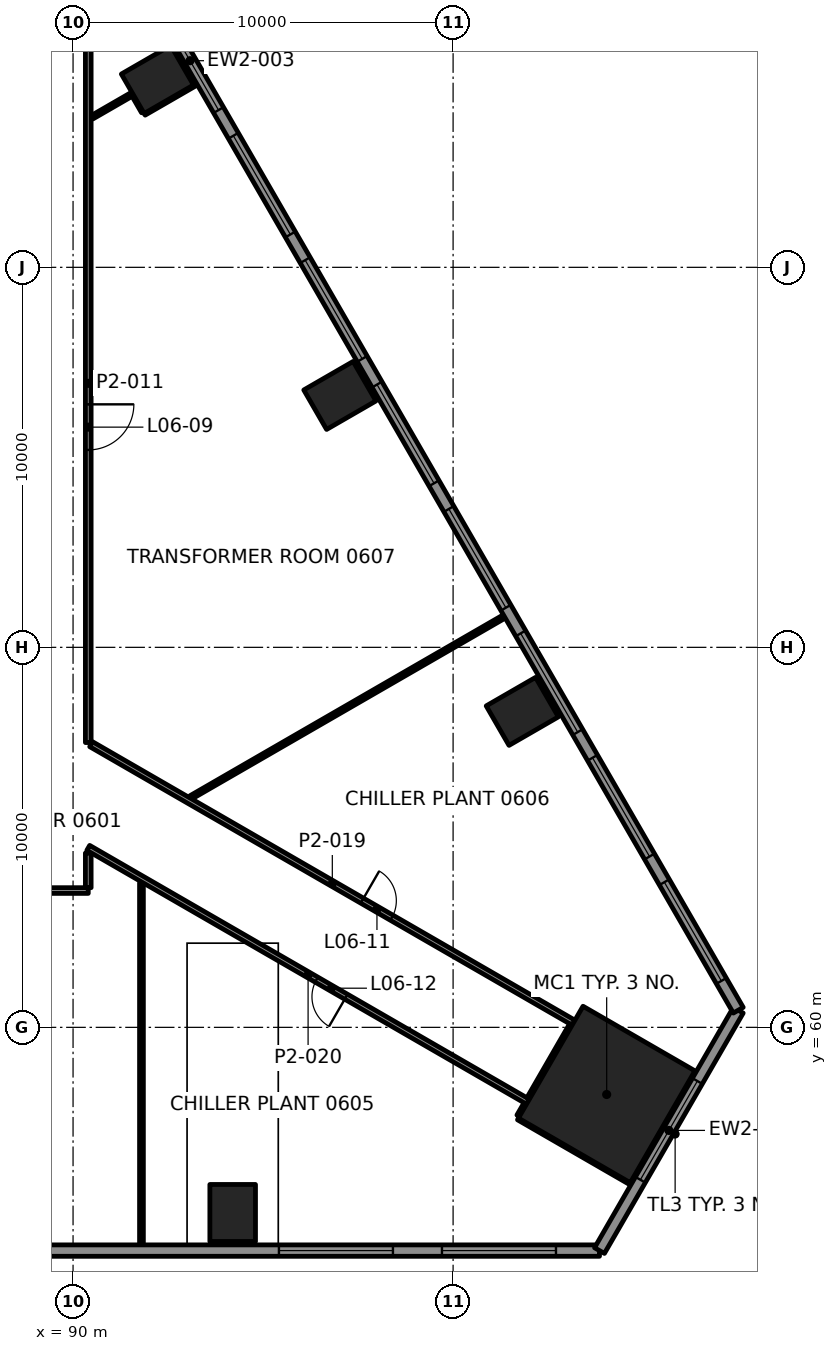
"""IFC4 building model, lengths in metres.
Left out: names, types, materials, properties, quantities, classifications, styles, units other than length and angle.
Written with IfcOpenShell. Run it as: python <this file> out.ifc"""

import sys

from ifc_helpers import new_model, si_unit, direction, frame, frame_2d, origin, origin_2d, place, context, subcontext, project, spatial, rectangle, extrude, element, fill, save


model = new_model("IFC4")
c1 = context("Model", 3, precision=1e-05, world=origin(), true_north=direction((0.0, 1.0)))
c2 = subcontext(c1, "Body", "Model", "MODEL_VIEW")
j1 = project(units=[si_unit("LENGTHUNIT", "METRE"), si_unit("PLANEANGLEUNIT", "RADIAN")], contexts=[c1])
p1 = place(None, origin())
s1 = spatial("IfcSite", under=j1, at=p1, CompositionType="ELEMENT")
p2 = place(p1, origin())
s2 = spatial("IfcBuilding", under=s1, at=p2, CompositionType="ELEMENT")
p3 = place(p2, frame((0.0, 0.0, 31.0)))
s3 = spatial("IfcBuildingStorey", under=s2, at=p3, CompositionType="ELEMENT", Elevation=31.0)
p4 = place(p3, frame((104.041, 58.233, 0.0), z_axis=(0.0, 0.0, 1.0), x_axis=(0.5, 0.866025403784, 0.0)))
e1 = element("IfcColumn", 1, at=p4, inside=s3, PredefinedType="COLUMN", context=c2, shape_type="SweptSolid", body=[
    extrude(rectangle(XDim=3.4, YDim=3.4, at=origin_2d()), origin(), (0.0, 0.0, 1.0), 4.5),
])
for number, where, z_axis, x_axis in (
    (2, (94.2, 55.115, -0.0), (0.0, 0.0, 1.0), (1.0, 0.0, 0.0)),
    (3, (101.821, 68.315, -0.0), (0.0, 0.0, 1.0), (-0.5, 0.866, 0.0)),
    (4, (97.021, 76.628, -0.0), (0.0, 0.0, 1.0), (-0.5, 0.866, 0.0)),
    (5, (92.22, 84.942, -0.0), (0.0, 0.0, 1.0), (-0.5, 0.866, 0.0)),
):
    element("IfcColumn", number, at=place(p3, frame(where, z_axis=z_axis, x_axis=x_axis)), inside=s3, PredefinedType="COLUMN", context=c2, shape_type="SweptSolid", body=[
        extrude(rectangle(XDim=1.2, YDim=1.5, at=origin_2d()), origin(), (0.0, 0.0, 1.0), 4.5),
    ])
p5 = place(p3, frame((90.4, 63.6, 0.0), z_axis=(0.0, 0.0, 1.0), x_axis=(-1.0, 0.0, 0.0)))
e6 = element("IfcWall", 6, at=p5, inside=s3, PredefinedType="PARTITIONING", context=c2, shape_type="SweptSolid", body=[
    extrude(rectangle(XDim=30.799, YDim=0.15, at=frame_2d((15.4, 0.0))), origin(), (0.0, 0.0, 1.0), 3.45),
])
p6 = place(p5, frame((6.001, 0.0, 0.0)))
e7 = element("IfcOpeningElement", 7, at=p6, cuts=e6, PredefinedType="OPENING", context=c2, shape_type="SweptSolid", body=[
    extrude(rectangle(XDim=1.2, YDim=2.1, at=frame_2d((0.6, 1.05))), frame((0.0, 0.085, 0.0), z_axis=(0.0, -1.0, 0.0), x_axis=(1.0, 0.0, 0.0)), (0.0, 0.0, 1.0), 0.17),
])
p7 = place(p5, frame((18.55, 0.0, 0.0)))
e8 = element("IfcOpeningElement", 8, at=p7, cuts=e6, PredefinedType="OPENING", context=c2, shape_type="SweptSolid", body=[
    extrude(rectangle(XDim=0.9, YDim=2.1, at=frame_2d((0.45, 1.05))), frame((0.0, 0.085, 0.0), z_axis=(0.0, -1.0, 0.0), x_axis=(1.0, 0.0, 0.0)), (0.0, 0.0, 1.0), 0.17),
])
p8 = place(p5, frame((27.198, 0.0, 0.0)))
e9 = element("IfcOpeningElement", 9, at=p8, cuts=e6, PredefinedType="OPENING", context=c2, shape_type="SweptSolid", body=[
    extrude(rectangle(XDim=1.2, YDim=2.1, at=frame_2d((0.6, 1.05))), frame((0.0, 0.085, 0.0), z_axis=(0.0, -1.0, 0.0), x_axis=(1.0, 0.0, 0.0)), (0.0, 0.0, 1.0), 0.17),
])
p9 = place(p3, frame((93.101, 66.052, 0.0), z_axis=(0.0, 0.0, 1.0), x_axis=(0.86603464891, 0.49998398663, 0.0)))
e10 = element("IfcWall", 10, at=p9, inside=s3, PredefinedType="PARTITIONING", context=c2, shape_type="SweptSolid", body=[
    extrude(rectangle(XDim=9.643, YDim=0.1, at=frame_2d((4.821, 0.0))), origin(), (0.0, 0.0, 1.0), 3.215),
])
p10 = place(p3, frame((91.871, 84.048, 0.0), z_axis=(0.0, 0.0, 1.0), x_axis=(0.866026058841, 0.499998865407, 0.0)))
e11 = element("IfcWall", 11, at=p10, inside=s3, PredefinedType="PARTITIONING", context=c2, shape_type="SweptSolid", body=[
    extrude(rectangle(XDim=1.708, YDim=0.1, at=frame_2d((0.854, 0.0))), origin(), (0.0, 0.0, 1.0), 3.215),
])
p11 = place(p3, frame((90.501, 83.95, 0.0), z_axis=(0.0, 0.0, 1.0), x_axis=(0.866057204957, 0.499944914708, 0.0)))
e12 = element("IfcWall", 12, at=p11, inside=s3, PredefinedType="PARTITIONING", context=c2, shape_type="SweptSolid", body=[
    extrude(rectangle(XDim=1.235, YDim=0.1, at=frame_2d((0.618, 0.0))), origin(), (0.0, 0.0, 1.0), 3.45),
])
p12 = place(p3, frame((101.744, 57.655, 0.0), z_axis=(0.0, 0.0, 1.0), x_axis=(0.500136362069, 0.865946660792, 0.0)))
e13 = element("IfcWall", 13, at=p12, inside=s3, PredefinedType="PARTITIONING", context=c2, shape_type="SweptSolid", body=[
    extrude(rectangle(XDim=0.375, YDim=0.15, at=frame_2d((0.187, 0.0))), origin(), (0.0, 0.0, 1.0), 3.45),
])
p13 = place(p3, frame((91.8, 54.155, 0.0), z_axis=(0.0, 0.0, 1.0), x_axis=(0.0, 1.0, 0.0)))
e14 = element("IfcWall", 14, at=p13, inside=s3, PredefinedType="PARTITIONING", context=c2, shape_type="SweptSolid", body=[
    extrude(rectangle(XDim=9.643, YDim=0.1, at=frame_2d((4.822, 0.0))), origin(), (0.0, 0.0, 1.0), 3.45),
])
p14 = place(p3, frame((90.4, 63.675, 0.0), z_axis=(0.0, 0.0, 1.0), x_axis=(0.0, 1.0, 0.0)))
e15 = element("IfcWall", 15, at=p14, inside=s3, PredefinedType="PARTITIONING", context=c2, shape_type="SweptSolid", body=[
    extrude(rectangle(XDim=0.912, YDim=0.15, at=frame_2d((0.456, 0.0))), origin(), (0.0, 0.0, 1.0), 3.45),
])
p15 = place(p3, frame((90.4, 86.399, 0.0), z_axis=(0.0, 0.0, 1.0), x_axis=(0.0, -1.0, 0.0)))
e16 = element("IfcWall", 16, at=p15, inside=s3, PredefinedType="PARTITIONING", context=c2, shape_type="SweptSolid", body=[
    extrude(rectangle(XDim=18.905, YDim=0.15, at=frame_2d((9.453, 0.0))), origin(), (0.0, 0.0, 1.0), 3.45),
])
p16 = place(p15, frame((10.005, 0.0, 0.0)))
e17 = element("IfcOpeningElement", 17, at=p16, cuts=e16, PredefinedType="OPENING", context=c2, shape_type="SweptSolid", body=[
    extrude(rectangle(XDim=1.2, YDim=2.1, at=frame_2d((0.6, 1.05))), frame((0.0, 0.085, 0.0), z_axis=(0.0, -1.0, 0.0), x_axis=(1.0, 0.0, 0.0)), (0.0, 0.0, 1.0), 0.17),
])
p17 = place(p3, frame((91.846, 84.092, 0.0), z_axis=(0.0, 0.0, 1.0), x_axis=(-0.500244977835, 0.865883919559, 0.0)))
e18 = element("IfcWall", 18, at=p17, inside=s3, PredefinedType="PARTITIONING", context=c2, shape_type="SweptSolid", body=[
    extrude(rectangle(XDim=0.499, YDim=0.1, at=frame_2d((0.25, 0.0))), origin(), (0.0, 0.0, 1.0), 3.45),
])
p18 = place(p3, frame((90.475, 67.451, 0.0), z_axis=(0.0, 0.0, 1.0), x_axis=(0.866022484069, -0.500005057062, 0.0)))
e19 = element("IfcWall", 19, at=p18, inside=s3, PredefinedType="PARTITIONING", context=c2, shape_type="SweptSolid", body=[
    extrude(rectangle(XDim=14.657, YDim=0.15, at=frame_2d((7.329, 0.0))), origin(), (0.0, 0.0, 1.0), 3.45),
])
p19 = place(p18, frame((8.235, 0.0, 0.0)))
e20 = element("IfcOpeningElement", 20, at=p19, cuts=e19, PredefinedType="OPENING", context=c2, shape_type="SweptSolid", body=[
    extrude(rectangle(XDim=0.9, YDim=2.1, at=frame_2d((0.45, 1.05))), frame((0.0, 0.085, 0.0), z_axis=(0.0, -1.0, 0.0), x_axis=(1.0, 0.0, 0.0)), (0.0, 0.0, 1.0), 0.17),
])
p20 = place(p3, frame((101.969, 58.044, 0.0), z_axis=(0.0, 0.0, 1.0), x_axis=(-0.866027935033, 0.499995615723, 0.0)))
e21 = element("IfcWall", 21, at=p20, inside=s3, PredefinedType="PARTITIONING", context=c2, shape_type="SweptSolid", body=[
    extrude(rectangle(XDim=13.358, YDim=0.15, at=frame_2d((6.679, 0.0))), origin(), (0.0, 0.0, 1.0), 3.297),
])
p21 = place(p20, frame((5.522, 0.0, 0.0)))
e22 = element("IfcOpeningElement", 22, at=p21, cuts=e21, PredefinedType="OPENING", context=c2, shape_type="SweptSolid", body=[
    extrude(rectangle(XDim=0.9, YDim=2.1, at=frame_2d((0.45, 1.05))), frame((0.0, 0.085, 0.0), z_axis=(0.0, -1.0, 0.0), x_axis=(1.0, 0.0, 0.0)), (0.0, 0.0, 1.0), 0.17),
])
p22 = place(p3, frame((104.802, 55.831, 0.0), z_axis=(0.0, 0.0, 1.0), x_axis=(-0.866014251095, 0.500019316528, 0.0)))
e23 = element("IfcWall", 23, at=p22, inside=s3, PredefinedType="PARTITIONING", context=c2, shape_type="SweptSolid", body=[
    extrude(rectangle(XDim=3.559, YDim=0.1, at=frame_2d((1.78, 0.0))), origin(), (0.0, 0.0, 1.0), 3.45),
])
p23 = place(p3, frame((102.007, 58.109, 0.0), z_axis=(0.0, 0.0, 1.0), x_axis=(0.499979232204, 0.866037393745, 0.0)))
e24 = element("IfcWall", 24, at=p23, inside=s3, PredefinedType="PARTITIONING", context=c2, shape_type="SweptSolid", body=[
    extrude(rectangle(XDim=2.25, YDim=0.15, at=frame_2d((1.125, 0.0))), origin(), (0.0, 0.0, 1.0), 3.297),
])
p24 = place(p3, frame((46.148, 54.125, 0.0), z_axis=(0.0, 0.0, 1.0), x_axis=(1.0, 0.0, 0.0)))
e25 = element("IfcWall", 25, at=p24, inside=s3, PredefinedType="SOLIDWALL", context=c2, shape_type="SweptSolid", body=[
    extrude(rectangle(XDim=57.704, YDim=0.3, at=frame_2d((28.852, 0.0))), origin(), (0.0, 0.0, 1.0), 4.05),
])
p25 = place(p24, frame((1.145, 0.0, 0.8)))
e26 = element("IfcOpeningElement", 26, at=p25, cuts=e25, PredefinedType="OPENING", context=c2, shape_type="SweptSolid", body=[
    extrude(rectangle(XDim=3.0, YDim=2.4, at=frame_2d((1.5, 1.2))), frame((0.0, 0.16, 0.0), z_axis=(0.0, -1.0, 0.0), x_axis=(1.0, 0.0, 0.0)), (0.0, 0.0, 1.0), 0.32),
])
p26 = place(p24, frame((5.435, 0.0, 0.8)))
e27 = element("IfcOpeningElement", 27, at=p26, cuts=e25, PredefinedType="OPENING", context=c2, shape_type="SweptSolid", body=[
    extrude(rectangle(XDim=3.0, YDim=2.4, at=frame_2d((1.5, 1.2))), frame((0.0, 0.16, 0.0), z_axis=(0.0, -1.0, 0.0), x_axis=(1.0, 0.0, 0.0)), (0.0, 0.0, 1.0), 0.32),
])
p27 = place(p24, frame((49.269, 0.0, 0.8)))
e28 = element("IfcOpeningElement", 28, at=p27, cuts=e25, PredefinedType="OPENING", context=c2, shape_type="SweptSolid", body=[
    extrude(rectangle(XDim=3.0, YDim=2.4, at=frame_2d((1.5, 1.2))), frame((0.0, 0.16, 0.0), z_axis=(0.0, -1.0, 0.0), x_axis=(1.0, 0.0, 0.0)), (0.0, 0.0, 1.0), 0.32),
])
p28 = place(p24, frame((53.559, 0.0, 0.8)))
e29 = element("IfcOpeningElement", 29, at=p28, cuts=e25, PredefinedType="OPENING", context=c2, shape_type="SweptSolid", body=[
    extrude(rectangle(XDim=3.0, YDim=2.4, at=frame_2d((1.5, 1.2))), frame((0.0, 0.16, 0.0), z_axis=(0.0, -1.0, 0.0), x_axis=(1.0, 0.0, 0.0)), (0.0, 0.0, 1.0), 0.32),
])
p29 = place(p3, frame((103.852, 54.125, 0.0), z_axis=(0.0, 0.0, 1.0), x_axis=(0.500000231294, 0.866025270247, 0.0)))
e30 = element("IfcWall", 30, at=p29, inside=s3, PredefinedType="SOLIDWALL", context=c2, shape_type="SweptSolid", body=[
    extrude(rectangle(XDim=7.304, YDim=0.3, at=frame_2d((3.652, 0.0))), origin(), (0.0, 0.0, 1.0), 4.05),
])
p30 = place(p29, frame((2.152, 0.0, 0.8)))
e31 = element("IfcOpeningElement", 31, at=p30, cuts=e30, PredefinedType="OPENING", context=c2, shape_type="SweptSolid", body=[
    extrude(rectangle(XDim=3.0, YDim=2.4, at=frame_2d((1.5, 1.2))), frame((0.0, 0.16, 0.0), z_axis=(0.0, -1.0, 0.0), x_axis=(1.0, 0.0, 0.0)), (0.0, 0.0, 1.0), 0.32),
])
p31 = place(p3, frame((107.504, 60.451, 0.0), z_axis=(0.0, 0.0, 1.0), x_axis=(-0.500000550228, 0.86602508611, 0.0)))
e32 = element("IfcWall", 32, at=p31, inside=s3, PredefinedType="SOLIDWALL", context=c2, shape_type="SweptSolid", body=[
    extrude(rectangle(XDim=57.704, YDim=0.3, at=frame_2d((28.852, 0.0))), origin(), (0.0, 0.0, 1.0), 4.05),
])
p32 = place(p31, frame((0.89, 0.0, 0.8)))
e33 = element("IfcOpeningElement", 33, at=p32, cuts=e32, PredefinedType="OPENING", context=c2, shape_type="SweptSolid", body=[
    extrude(rectangle(XDim=3.0, YDim=2.4, at=frame_2d((1.5, 1.2))), frame((0.0, 0.16, 0.0), z_axis=(0.0, -1.0, 0.0), x_axis=(1.0, 0.0, 0.0)), (0.0, 0.0, 1.0), 0.32),
])
p33 = place(p31, frame((4.67, 0.0, 0.8)))
e34 = element("IfcOpeningElement", 34, at=p33, cuts=e32, PredefinedType="OPENING", context=c2, shape_type="SweptSolid", body=[
    extrude(rectangle(XDim=3.0, YDim=2.4, at=frame_2d((1.5, 1.2))), frame((0.0, 0.16, 0.0), z_axis=(0.0, -1.0, 0.0), x_axis=(1.0, 0.0, 0.0)), (0.0, 0.0, 1.0), 0.32),
])
p34 = place(p31, frame((8.451, 0.0, 0.8)))
e35 = element("IfcOpeningElement", 35, at=p34, cuts=e32, PredefinedType="OPENING", context=c2, shape_type="SweptSolid", body=[
    extrude(rectangle(XDim=3.0, YDim=2.4, at=frame_2d((1.5, 1.2))), frame((0.0, 0.16, 0.0), z_axis=(0.0, -1.0, 0.0), x_axis=(1.0, 0.0, 0.0)), (0.0, 0.0, 1.0), 0.32),
])
p35 = place(p31, frame((12.231, 0.0, 0.8)))
e36 = element("IfcOpeningElement", 36, at=p35, cuts=e32, PredefinedType="OPENING", context=c2, shape_type="SweptSolid", body=[
    extrude(rectangle(XDim=3.0, YDim=2.4, at=frame_2d((1.5, 1.2))), frame((0.0, 0.16, 0.0), z_axis=(0.0, -1.0, 0.0), x_axis=(1.0, 0.0, 0.0)), (0.0, 0.0, 1.0), 0.32),
])
p36 = place(p31, frame((16.011, 0.0, 0.8)))
e37 = element("IfcOpeningElement", 37, at=p36, cuts=e32, PredefinedType="OPENING", context=c2, shape_type="SweptSolid", body=[
    extrude(rectangle(XDim=3.0, YDim=2.4, at=frame_2d((1.5, 1.2))), frame((0.0, 0.16, 0.0), z_axis=(0.0, -1.0, 0.0), x_axis=(1.0, 0.0, 0.0)), (0.0, 0.0, 1.0), 0.32),
])
p37 = place(p31, frame((19.792, 0.0, 0.8)))
e38 = element("IfcOpeningElement", 38, at=p37, cuts=e32, PredefinedType="OPENING", context=c2, shape_type="SweptSolid", body=[
    extrude(rectangle(XDim=3.0, YDim=2.4, at=frame_2d((1.5, 1.2))), frame((0.0, 0.16, 0.0), z_axis=(0.0, -1.0, 0.0), x_axis=(1.0, 0.0, 0.0)), (0.0, 0.0, 1.0), 0.32),
])
p38 = place(p31, frame((23.572, 0.0, 0.8)))
e39 = element("IfcOpeningElement", 39, at=p38, cuts=e32, PredefinedType="OPENING", context=c2, shape_type="SweptSolid", body=[
    extrude(rectangle(XDim=3.0, YDim=2.4, at=frame_2d((1.5, 1.2))), frame((0.0, 0.16, 0.0), z_axis=(0.0, -1.0, 0.0), x_axis=(1.0, 0.0, 0.0)), (0.0, 0.0, 1.0), 0.32),
])
p39 = place(p31, frame((27.352, 0.0, 0.8)))
e40 = element("IfcOpeningElement", 40, at=p39, cuts=e32, PredefinedType="OPENING", context=c2, shape_type="SweptSolid", body=[
    extrude(rectangle(XDim=3.0, YDim=2.4, at=frame_2d((1.5, 1.2))), frame((0.0, 0.16, 0.0), z_axis=(0.0, -1.0, 0.0), x_axis=(1.0, 0.0, 0.0)), (0.0, 0.0, 1.0), 0.32),
])
p40 = place(p31, frame((31.132, 0.0, 0.8)))
e41 = element("IfcOpeningElement", 41, at=p40, cuts=e32, PredefinedType="OPENING", context=c2, shape_type="SweptSolid", body=[
    extrude(rectangle(XDim=3.0, YDim=2.4, at=frame_2d((1.5, 1.2))), frame((0.0, 0.16, 0.0), z_axis=(0.0, -1.0, 0.0), x_axis=(1.0, 0.0, 0.0)), (0.0, 0.0, 1.0), 0.32),
])
p41 = place(p31, frame((34.913, 0.0, 0.8)))
e42 = element("IfcOpeningElement", 42, at=p41, cuts=e32, PredefinedType="OPENING", context=c2, shape_type="SweptSolid", body=[
    extrude(rectangle(XDim=3.0, YDim=2.4, at=frame_2d((1.5, 1.2))), frame((0.0, 0.16, 0.0), z_axis=(0.0, -1.0, 0.0), x_axis=(1.0, 0.0, 0.0)), (0.0, 0.0, 1.0), 0.32),
])
p42 = place(p31, frame((38.693, 0.0, 0.8)))
e43 = element("IfcOpeningElement", 43, at=p42, cuts=e32, PredefinedType="OPENING", context=c2, shape_type="SweptSolid", body=[
    extrude(rectangle(XDim=3.0, YDim=2.4, at=frame_2d((1.5, 1.2))), frame((0.0, 0.16, 0.0), z_axis=(0.0, -1.0, 0.0), x_axis=(1.0, 0.0, 0.0)), (0.0, 0.0, 1.0), 0.32),
])
p43 = place(p31, frame((42.473, 0.0, 0.8)))
e44 = element("IfcOpeningElement", 44, at=p43, cuts=e32, PredefinedType="OPENING", context=c2, shape_type="SweptSolid", body=[
    extrude(rectangle(XDim=3.0, YDim=2.4, at=frame_2d((1.5, 1.2))), frame((0.0, 0.16, 0.0), z_axis=(0.0, -1.0, 0.0), x_axis=(1.0, 0.0, 0.0)), (0.0, 0.0, 1.0), 0.32),
])
p44 = place(p31, frame((46.253, 0.0, 0.8)))
e45 = element("IfcOpeningElement", 45, at=p44, cuts=e32, PredefinedType="OPENING", context=c2, shape_type="SweptSolid", body=[
    extrude(rectangle(XDim=3.0, YDim=2.4, at=frame_2d((1.5, 1.2))), frame((0.0, 0.16, 0.0), z_axis=(0.0, -1.0, 0.0), x_axis=(1.0, 0.0, 0.0)), (0.0, 0.0, 1.0), 0.32),
])
p45 = place(p31, frame((50.033, 0.0, 0.8)))
e46 = element("IfcOpeningElement", 46, at=p45, cuts=e32, PredefinedType="OPENING", context=c2, shape_type="SweptSolid", body=[
    extrude(rectangle(XDim=3.0, YDim=2.4, at=frame_2d((1.5, 1.2))), frame((0.0, 0.16, 0.0), z_axis=(0.0, -1.0, 0.0), x_axis=(1.0, 0.0, 0.0)), (0.0, 0.0, 1.0), 0.32),
])
p46 = place(p31, frame((53.814, 0.0, 0.8)))
e47 = element("IfcOpeningElement", 47, at=p46, cuts=e32, PredefinedType="OPENING", context=c2, shape_type="SweptSolid", body=[
    extrude(rectangle(XDim=3.0, YDim=2.4, at=frame_2d((1.5, 1.2))), frame((0.0, 0.16, 0.0), z_axis=(0.0, -1.0, 0.0), x_axis=(1.0, 0.0, 0.0)), (0.0, 0.0, 1.0), 0.32),
])
p47 = place(p16, origin())
e48 = element("IfcDoor", 48, at=p47, inside=s3, OperationType="DOUBLE_DOOR_SINGLE_SWING", PredefinedType="DOOR", context=c2, shape_type="SweptSolid", body=[
    extrude(rectangle(XDim=1.2, YDim=2.1, at=frame_2d((0.6, 1.05))), frame((0.0, 0.025, 0.0), z_axis=(0.0, -1.0, 0.0), x_axis=(1.0, 0.0, 0.0)), (0.0, 0.0, 1.0), 0.05),
])
fill(e17, e48)
p48 = place(p19, origin())
e49 = element("IfcDoor", 49, at=p48, inside=s3, OperationType="SINGLE_SWING_RIGHT", PredefinedType="DOOR", context=c2, shape_type="SweptSolid", body=[
    extrude(rectangle(XDim=0.9, YDim=2.1, at=frame_2d((0.45, 1.05))), frame((0.0, 0.025, 0.0), z_axis=(0.0, -1.0, 0.0), x_axis=(1.0, 0.0, 0.0)), (0.0, 0.0, 1.0), 0.05),
])
fill(e20, e49)
p49 = place(p21, origin())
e50 = element("IfcDoor", 50, at=p49, inside=s3, OperationType="SINGLE_SWING_RIGHT", PredefinedType="DOOR", context=c2, shape_type="SweptSolid", body=[
    extrude(rectangle(XDim=0.9, YDim=2.1, at=frame_2d((0.45, 1.05))), frame((0.0, 0.025, 0.0), z_axis=(0.0, -1.0, 0.0), x_axis=(1.0, 0.0, 0.0)), (0.0, 0.0, 1.0), 0.05),
])
fill(e22, e50)
p50 = place(p27, origin())
e51 = element("IfcWindow", 51, at=p50, inside=s3, PartitioningType="SINGLE_PANEL", PredefinedType="WINDOW", context=c2, shape_type="SweptSolid", body=[
    extrude(rectangle(XDim=3.0, YDim=2.4, at=frame_2d((1.5, 1.2))), frame((0.0, 0.03, 0.0), z_axis=(0.0, -1.0, 0.0), x_axis=(1.0, 0.0, 0.0)), (0.0, 0.0, 1.0), 0.06),
])
fill(e28, e51)
p51 = place(p28, origin())
e52 = element("IfcWindow", 52, at=p51, inside=s3, PartitioningType="SINGLE_PANEL", PredefinedType="WINDOW", context=c2, shape_type="SweptSolid", body=[
    extrude(rectangle(XDim=3.0, YDim=2.4, at=frame_2d((1.5, 1.2))), frame((0.0, 0.03, 0.0), z_axis=(0.0, -1.0, 0.0), x_axis=(1.0, 0.0, 0.0)), (0.0, 0.0, 1.0), 0.06),
])
fill(e29, e52)
p52 = place(p30, origin())
e53 = element("IfcWindow", 53, at=p52, inside=s3, PartitioningType="SINGLE_PANEL", PredefinedType="WINDOW", context=c2, shape_type="SweptSolid", body=[
    extrude(rectangle(XDim=3.0, YDim=2.4, at=frame_2d((1.5, 1.2))), frame((0.0, 0.03, 0.0), z_axis=(0.0, -1.0, 0.0), x_axis=(1.0, 0.0, 0.0)), (0.0, 0.0, 1.0), 0.06),
])
fill(e31, e53)
p53 = place(p32, origin())
e54 = element("IfcWindow", 54, at=p53, inside=s3, PartitioningType="SINGLE_PANEL", PredefinedType="WINDOW", context=c2, shape_type="SweptSolid", body=[
    extrude(rectangle(XDim=3.0, YDim=2.4, at=frame_2d((1.5, 1.2))), frame((0.0, 0.03, 0.0), z_axis=(0.0, -1.0, 0.0), x_axis=(1.0, 0.0, 0.0)), (0.0, 0.0, 1.0), 0.06),
])
fill(e33, e54)
p54 = place(p33, origin())
e55 = element("IfcWindow", 55, at=p54, inside=s3, PartitioningType="SINGLE_PANEL", PredefinedType="WINDOW", context=c2, shape_type="SweptSolid", body=[
    extrude(rectangle(XDim=3.0, YDim=2.4, at=frame_2d((1.5, 1.2))), frame((0.0, 0.03, 0.0), z_axis=(0.0, -1.0, 0.0), x_axis=(1.0, 0.0, 0.0)), (0.0, 0.0, 1.0), 0.06),
])
fill(e34, e55)
p55 = place(p34, origin())
e56 = element("IfcWindow", 56, at=p55, inside=s3, PartitioningType="SINGLE_PANEL", PredefinedType="WINDOW", context=c2, shape_type="SweptSolid", body=[
    extrude(rectangle(XDim=3.0, YDim=2.4, at=frame_2d((1.5, 1.2))), frame((0.0, 0.03, 0.0), z_axis=(0.0, -1.0, 0.0), x_axis=(1.0, 0.0, 0.0)), (0.0, 0.0, 1.0), 0.06),
])
fill(e35, e56)
p56 = place(p35, origin())
e57 = element("IfcWindow", 57, at=p56, inside=s3, PartitioningType="SINGLE_PANEL", PredefinedType="WINDOW", context=c2, shape_type="SweptSolid", body=[
    extrude(rectangle(XDim=3.0, YDim=2.4, at=frame_2d((1.5, 1.2))), frame((0.0, 0.03, 0.0), z_axis=(0.0, -1.0, 0.0), x_axis=(1.0, 0.0, 0.0)), (0.0, 0.0, 1.0), 0.06),
])
fill(e36, e57)
p57 = place(p36, origin())
e58 = element("IfcWindow", 58, at=p57, inside=s3, PartitioningType="SINGLE_PANEL", PredefinedType="WINDOW", context=c2, shape_type="SweptSolid", body=[
    extrude(rectangle(XDim=3.0, YDim=2.4, at=frame_2d((1.5, 1.2))), frame((0.0, 0.03, 0.0), z_axis=(0.0, -1.0, 0.0), x_axis=(1.0, 0.0, 0.0)), (0.0, 0.0, 1.0), 0.06),
])
fill(e37, e58)
p58 = place(p37, origin())
e59 = element("IfcWindow", 59, at=p58, inside=s3, PartitioningType="SINGLE_PANEL", PredefinedType="WINDOW", context=c2, shape_type="SweptSolid", body=[
    extrude(rectangle(XDim=3.0, YDim=2.4, at=frame_2d((1.5, 1.2))), frame((0.0, 0.03, 0.0), z_axis=(0.0, -1.0, 0.0), x_axis=(1.0, 0.0, 0.0)), (0.0, 0.0, 1.0), 0.06),
])
fill(e38, e59)
p59 = place(p38, origin())
e60 = element("IfcWindow", 60, at=p59, inside=s3, PartitioningType="SINGLE_PANEL", PredefinedType="WINDOW", context=c2, shape_type="SweptSolid", body=[
    extrude(rectangle(XDim=3.0, YDim=2.4, at=frame_2d((1.5, 1.2))), frame((0.0, 0.03, 0.0), z_axis=(0.0, -1.0, 0.0), x_axis=(1.0, 0.0, 0.0)), (0.0, 0.0, 1.0), 0.06),
])
fill(e39, e60)
p60 = place(p39, origin())
e61 = element("IfcWindow", 61, at=p60, inside=s3, PartitioningType="SINGLE_PANEL", PredefinedType="WINDOW", context=c2, shape_type="SweptSolid", body=[
    extrude(rectangle(XDim=3.0, YDim=2.4, at=frame_2d((1.5, 1.2))), frame((0.0, 0.03, 0.0), z_axis=(0.0, -1.0, 0.0), x_axis=(1.0, 0.0, 0.0)), (0.0, 0.0, 1.0), 0.06),
])
fill(e40, e61)
save(model, sys.argv[1])
